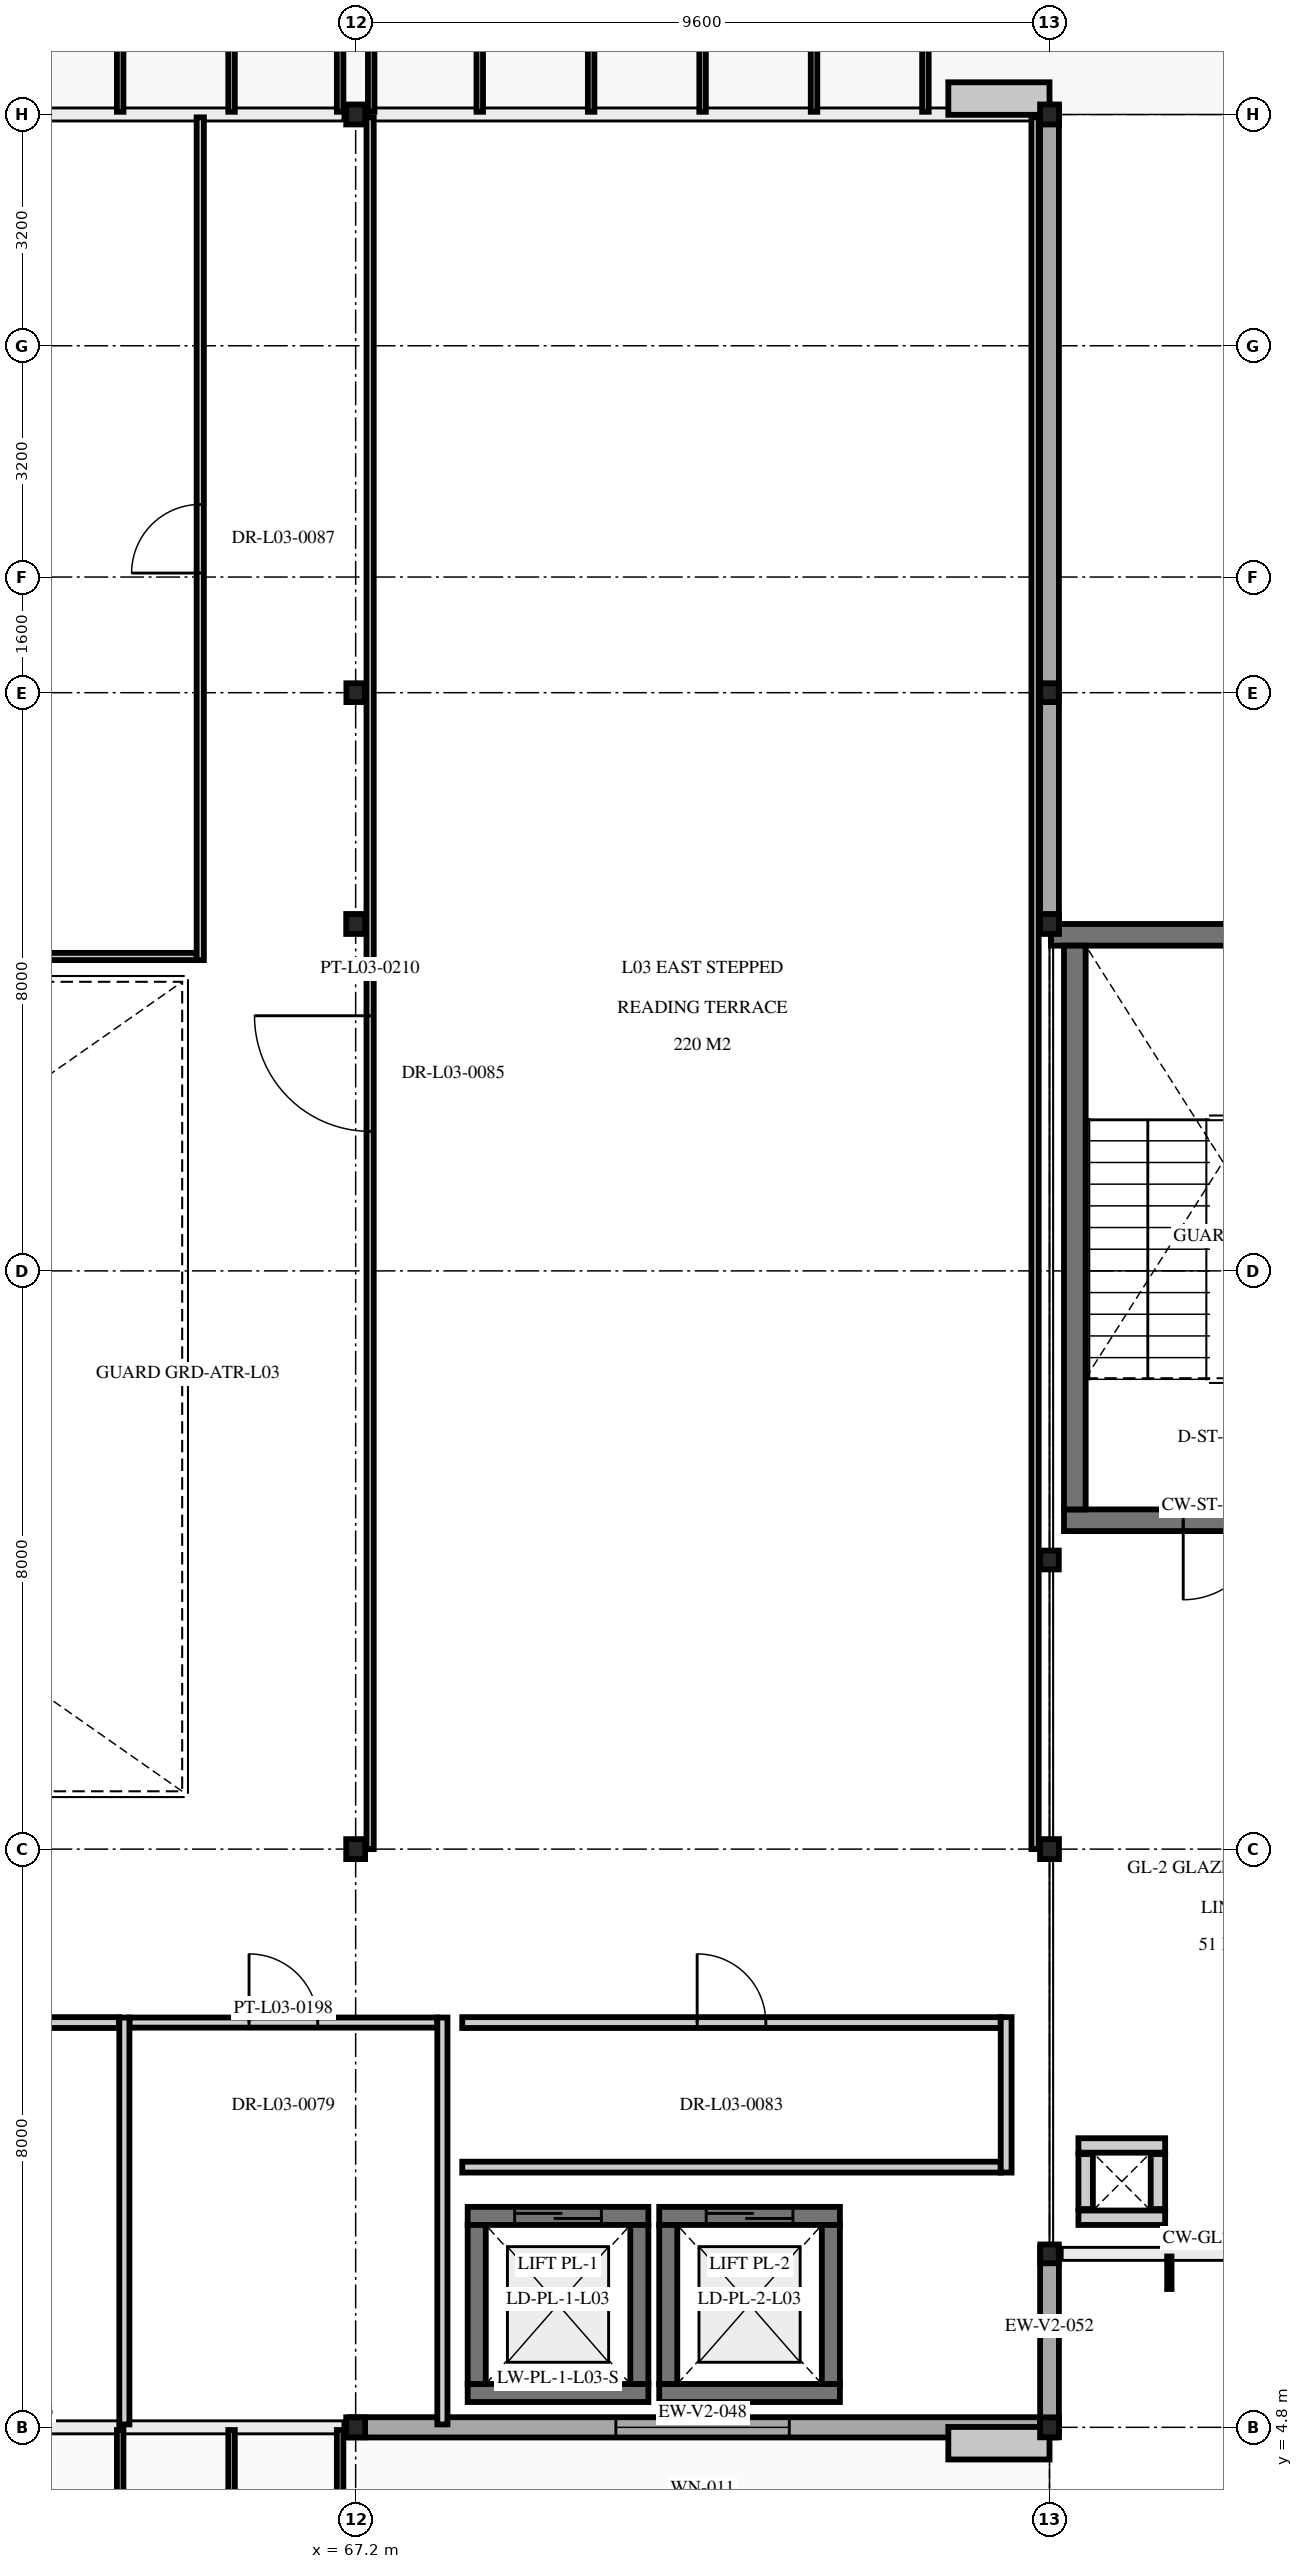
"""IFC4 building model, lengths in metres.
Left out: names, types, materials, properties, quantities, classifications, styles, units other than length and angle.
Written with IfcOpenShell. Run it as: python <this file> out.ifc"""

import sys

from ifc_helpers import new_model, si_unit, direction, frame, frame_2d, origin, origin_2d, place, context, subcontext, project, spatial, rectangle, i_section, extrude, element, fill, save


model = new_model("IFC4")
c1 = context("Model", 3, precision=1e-05, world=origin(), true_north=direction((0.0, 1.0)))
c2 = subcontext(c1, "Body", "Model", "MODEL_VIEW")
j1 = project(units=[si_unit("LENGTHUNIT", "METRE"), si_unit("PLANEANGLEUNIT", "RADIAN")], contexts=[c1])
p1 = place(None, origin())
s1 = spatial("IfcSite", under=j1, at=p1, CompositionType="ELEMENT")
p2 = place(p1, origin())
s2 = spatial("IfcBuilding", under=s1, at=p2, CompositionType="ELEMENT")
p3 = place(p2, frame((0.0, 0.0, 14.1)))
s3 = spatial("IfcBuildingStorey", under=s2, at=p3, CompositionType="ELEMENT", Elevation=14.1)
for number, where, z_axis, x_axis in (
    (1, (67.2, 4.8, 0.0), (0.0, 0.0, 1.0), (1.0, 0.0, 0.0)),
    (2, (67.2, 12.8, 0.0), (0.0, 0.0, 1.0), (1.0, 0.0, 0.0)),
    (3, (67.2, 25.6, 0.0), (0.0, 0.0, 1.0), (1.0, 0.0, 0.0)),
    (4, (67.2, 36.8, 0.0), (0.0, 0.0, 1.0), (1.0, 0.0, 0.0)),
    (5, (76.8, 4.8, 0.0), (0.0, 0.0, 1.0), (1.0, 0.0, 0.0)),
    (6, (76.8, 12.8, 0.0), (0.0, 0.0, 1.0), (1.0, 0.0, 0.0)),
    (7, (76.8, 25.6, 0.0), (0.0, 0.0, 1.0), (1.0, 0.0, 0.0)),
    (8, (76.8, 36.8, 0.0), (0.0, 0.0, 1.0), (1.0, 0.0, 0.0)),
):
    element("IfcColumn", number, at=place(p3, frame(where, z_axis=z_axis, x_axis=x_axis)), inside=s3, PredefinedType="COLUMN", context=c2, shape_type="SweptSolid", body=[
        extrude(i_section(OverallWidth=0.261, OverallDepth=0.276, WebThickness=0.015, FlangeThickness=0.025, at=origin_2d()), origin(), (0.0, 0.0, 1.0), 4.5),
    ])
for number, where, z_axis, x_axis in (
    (9, (67.2, 28.8, 0.0), (0.0, 0.0, 1.0), (1.0, 0.0, 0.0)),
    (10, (76.8, 28.8, 0.0), (0.0, 0.0, 1.0), (1.0, 0.0, 0.0)),
    (11, (76.8, 7.2, 0.0), (0.0, 0.0, 1.0), (1.0, 0.0, 0.0)),
    (12, (76.8, 16.8, 0.0), (0.0, 0.0, 1.0), (1.0, 0.0, 0.0)),
):
    element("IfcColumn", number, at=place(p3, frame(where, z_axis=z_axis, x_axis=x_axis)), inside=s3, PredefinedType="COLUMN", context=c2, shape_type="SweptSolid", body=[
        extrude(i_section(OverallWidth=0.256, OverallDepth=0.26, WebThickness=0.01, FlangeThickness=0.017, at=origin_2d()), origin(), (0.0, 0.0, 1.0), 4.5),
    ])
p4 = place(p3, frame((81.4, 17.35, 0.0), z_axis=(0.0, 0.0, 1.0), x_axis=(-1.0, 0.0, 0.0)))
e13 = element("IfcWall", 13, at=p4, inside=s3, PredefinedType="SHEAR", context=c2, shape_type="SweptSolid", body=[
    extrude(rectangle(XDim=4.4, YDim=0.3, at=frame_2d((2.2, 0.0))), origin(), (0.0, 0.0, 1.0), 4.25),
])
p5 = place(p4, frame((1.65, 0.0, 0.0)))
e14 = element("IfcOpeningElement", 14, at=p5, cuts=e13, PredefinedType="OPENING", context=c2, shape_type="SweptSolid", body=[
    extrude(rectangle(XDim=1.1, YDim=2.2, at=frame_2d((0.55, 1.1))), frame((0.0, 0.16, 0.0), z_axis=(0.0, -1.0, 0.0), x_axis=(1.0, 0.0, 0.0)), (0.0, 0.0, 1.0), 0.32),
])
p6 = place(p3, frame((76.82, 25.45, 0.0), z_axis=(0.0, 0.0, 1.0), x_axis=(1.0, 0.0, 0.0)))
e15 = element("IfcWall", 15, at=p6, inside=s3, PredefinedType="SHEAR", context=c2, shape_type="SweptSolid", body=[
    extrude(rectangle(XDim=4.76, YDim=0.3, at=frame_2d((2.38, 0.0))), origin(), (0.0, 0.0, 1.0), 4.25),
])
p7 = place(p3, frame((77.15, 17.5, 0.0), z_axis=(0.0, 0.0, 1.0), x_axis=(0.0, 1.0, 0.0)))
e16 = element("IfcWall", 16, at=p7, inside=s3, PredefinedType="SHEAR", context=c2, shape_type="SweptSolid", body=[
    extrude(rectangle(XDim=7.8, YDim=0.3, at=frame_2d((3.9, 0.0))), origin(), (0.0, 0.0, 1.0), 4.25),
])
p8 = place(p3, frame((71.25, 5.275, 0.0), z_axis=(0.0, 0.0, 1.0), x_axis=(-1.0, 0.0, 0.0)))
e17 = element("IfcWall", 17, at=p8, inside=s3, PredefinedType="SHEAR", context=c2, shape_type="SweptSolid", body=[
    extrude(rectangle(XDim=2.5, YDim=0.25, at=frame_2d((1.25, 0.0))), origin(), (0.0, 0.0, 1.0), 4.25),
])
p9 = place(p3, frame((68.75, 7.725, 0.0), z_axis=(0.0, 0.0, 1.0), x_axis=(1.0, 0.0, 0.0)))
e18 = element("IfcWall", 18, at=p9, inside=s3, PredefinedType="SHEAR", context=c2, shape_type="SweptSolid", body=[
    extrude(rectangle(XDim=2.5, YDim=0.25, at=frame_2d((1.25, 0.0))), origin(), (0.0, 0.0, 1.0), 4.25),
])
p10 = place(p9, frame((0.65, 0.0, 0.0)))
e19 = element("IfcOpeningElement", 19, at=p10, cuts=e18, PredefinedType="OPENING", context=c2, shape_type="SweptSolid", body=[
    extrude(rectangle(XDim=1.2, YDim=2.2, at=frame_2d((0.6, 1.1))), frame((0.0, 0.135, 0.0), z_axis=(0.0, -1.0, 0.0), x_axis=(1.0, 0.0, 0.0)), (0.0, 0.0, 1.0), 0.27),
])
for number, where, z_axis, x_axis in (
    (20, (68.875, 5.4, 0.0), (0.0, 0.0, 1.0), (0.0, 1.0, 0.0)),
    (21, (71.125, 7.6, 0.0), (0.0, 0.0, 1.0), (0.0, -1.0, 0.0)),
):
    element("IfcWall", number, at=place(p3, frame(where, z_axis=z_axis, x_axis=x_axis)), inside=s3, PredefinedType="SHEAR", context=c2, shape_type="SweptSolid", body=[
        extrude(rectangle(XDim=2.2, YDim=0.25, at=frame_2d((1.1, 0.0))), origin(), (0.0, 0.0, 1.0), 4.25),
    ])
p11 = place(p3, frame((73.9, 5.275, 0.0), z_axis=(0.0, 0.0, 1.0), x_axis=(-1.0, 0.0, 0.0)))
e22 = element("IfcWall", 22, at=p11, inside=s3, PredefinedType="SHEAR", context=c2, shape_type="SweptSolid", body=[
    extrude(rectangle(XDim=2.5, YDim=0.25, at=frame_2d((1.25, 0.0))), origin(), (0.0, 0.0, 1.0), 4.25),
])
p12 = place(p3, frame((71.4, 7.725, 0.0), z_axis=(0.0, 0.0, 1.0), x_axis=(1.0, 0.0, 0.0)))
e23 = element("IfcWall", 23, at=p12, inside=s3, PredefinedType="SHEAR", context=c2, shape_type="SweptSolid", body=[
    extrude(rectangle(XDim=2.5, YDim=0.25, at=frame_2d((1.25, 0.0))), origin(), (0.0, 0.0, 1.0), 4.25),
])
p13 = place(p12, frame((0.65, 0.0, 0.0)))
e24 = element("IfcOpeningElement", 24, at=p13, cuts=e23, PredefinedType="OPENING", context=c2, shape_type="SweptSolid", body=[
    extrude(rectangle(XDim=1.2, YDim=2.2, at=frame_2d((0.6, 1.1))), frame((0.0, 0.135, 0.0), z_axis=(0.0, -1.0, 0.0), x_axis=(1.0, 0.0, 0.0)), (0.0, 0.0, 1.0), 0.27),
])
for number, where, z_axis, x_axis in (
    (25, (71.525, 5.4, 0.0), (0.0, 0.0, 1.0), (0.0, 1.0, 0.0)),
    (26, (73.775, 7.6, 0.0), (0.0, 0.0, 1.0), (0.0, -1.0, 0.0)),
):
    element("IfcWall", number, at=place(p3, frame(where, z_axis=z_axis, x_axis=x_axis)), inside=s3, PredefinedType="SHEAR", context=c2, shape_type="SweptSolid", body=[
        extrude(rectangle(XDim=2.2, YDim=0.25, at=frame_2d((1.1, 0.0))), origin(), (0.0, 0.0, 1.0), 4.25),
    ])
for number, where, z_axis, x_axis in (
    (27, (78.4, 7.7, 0.0), (0.0, 0.0, 1.0), (-1.0, 0.0, 0.0)),
    (28, (77.2, 8.7, 0.0), (0.0, 0.0, 1.0), (1.0, 0.0, 0.0)),
):
    element("IfcWall", number, at=place(p3, frame(where, z_axis=z_axis, x_axis=x_axis)), inside=s3, PredefinedType="PARTITIONING", context=c2, shape_type="SweptSolid", body=[
        extrude(rectangle(XDim=1.2, YDim=0.2, at=frame_2d((0.6, 0.0))), origin(), (0.0, 0.0, 1.0), 3.75),
    ])
for number, where, z_axis, x_axis in (
    (29, (77.3, 7.82, 0.0), (0.0, 0.0, 1.0), (0.0, 1.0, 0.0)),
    (30, (78.3, 8.58, 0.0), (0.0, 0.0, 1.0), (0.0, -1.0, 0.0)),
):
    element("IfcWall", number, at=place(p3, frame(where, z_axis=z_axis, x_axis=x_axis)), inside=s3, PredefinedType="PARTITIONING", context=c2, shape_type="SweptSolid", body=[
        extrude(rectangle(XDim=0.76, YDim=0.2, at=frame_2d((0.38, 0.0))), origin(), (0.0, 0.0, 1.0), 3.75),
    ])
p14 = place(p3, frame((76.885, 4.8, 0.0), z_axis=(0.0, 0.0, 1.0), x_axis=(-1.0, 0.0, 0.0)))
e31 = element("IfcWall", 31, at=p14, inside=s3, PredefinedType="SOLIDWALL", context=c2, shape_type="SweptSolid", body=[
    extrude(rectangle(XDim=9.77, YDim=0.28, at=frame_2d((4.885, 0.0))), origin(), (0.0, 0.0, 1.0), 3.862),
])
p15 = place(p14, frame((3.685, 0.0, 0.95)))
e32 = element("IfcOpeningElement", 32, at=p15, cuts=e31, PredefinedType="OPENING", context=c2, shape_type="SweptSolid", body=[
    extrude(rectangle(XDim=2.4, YDim=2.1, at=frame_2d((1.2, 1.05))), frame((0.0, 0.15, 0.0), z_axis=(0.0, -1.0, 0.0), x_axis=(1.0, 0.0, 0.0)), (0.0, 0.0, 1.0), 0.3),
])
p16 = place(p3, frame((76.8, 7.285, 0.0), z_axis=(0.0, 0.0, 1.0), x_axis=(0.0, -1.0, 0.0)))
e33 = element("IfcWall", 33, at=p16, inside=s3, PredefinedType="SOLIDWALL", context=c2, shape_type="SweptSolid", body=[
    extrude(rectangle(XDim=2.57, YDim=0.26, at=frame_2d((1.285, 0.0))), origin(), (0.0, 0.0, 1.0), 3.835),
])
p17 = place(p3, frame((76.8, 36.885, 0.0), z_axis=(0.0, 0.0, 1.0), x_axis=(0.0, -1.0, 0.0)))
e34 = element("IfcWall", 34, at=p17, inside=s3, PredefinedType="SOLIDWALL", context=c2, shape_type="SweptSolid", body=[
    extrude(rectangle(XDim=11.37, YDim=0.26, at=frame_2d((5.685, 0.0))), origin(), (0.0, 0.0, 1.0), 3.835),
])
p18 = place(p3, frame((64.07, 10.4, 0.0), z_axis=(0.0, 0.0, 1.0), x_axis=(1.0, 0.0, 0.0)))
e35 = element("IfcWall", 35, at=p18, inside=s3, PredefinedType="PARTITIONING", context=c2, shape_type="SweptSolid", body=[
    extrude(rectangle(XDim=4.26, YDim=0.14, at=frame_2d((2.13, 0.0))), origin(), (0.0, 0.0, 1.0), 3.862),
])
p19 = place(p18, frame((1.655, 0.0, 0.0)))
e36 = element("IfcOpeningElement", 36, at=p19, cuts=e35, PredefinedType="OPENING", context=c2, shape_type="SweptSolid", body=[
    extrude(rectangle(XDim=0.95, YDim=2.1, at=frame_2d((0.475, 1.05))), frame((0.0, 0.08, 0.0), z_axis=(0.0, -1.0, 0.0), x_axis=(1.0, 0.0, 0.0)), (0.0, 0.0, 1.0), 0.16),
])
for number, where, z_axis, x_axis in (
    (37, (64.0, 4.84, 0.0), (0.0, 0.0, 1.0), (0.0, 1.0, 0.0)),
    (38, (68.4, 4.84, 0.0), (0.0, 0.0, 1.0), (0.0, 1.0, 0.0)),
):
    element("IfcWall", number, at=place(p3, frame(where, z_axis=z_axis, x_axis=x_axis)), inside=s3, PredefinedType="PARTITIONING", context=c2, shape_type="SweptSolid", body=[
        extrude(rectangle(XDim=5.63, YDim=0.14, at=frame_2d((2.815, 0.0))), origin(), (0.0, 0.0, 1.0), 3.965),
    ])
p20 = place(p3, frame((57.6, 10.4, 0.0), z_axis=(0.0, 0.0, 1.0), x_axis=(1.0, 0.0, 0.0)))
e39 = element("IfcWall", 39, at=p20, inside=s3, PredefinedType="PARTITIONING", context=c2, shape_type="SweptSolid", body=[
    extrude(rectangle(XDim=6.325, YDim=0.15, at=frame_2d((3.163, 0.0))), origin(), (0.0, 0.0, 1.0), 3.862),
])
p21 = place(p20, frame((2.587, 0.0, 0.0)))
e40 = element("IfcOpeningElement", 40, at=p21, cuts=e39, PredefinedType="OPENING", context=c2, shape_type="SweptSolid", body=[
    extrude(rectangle(XDim=1.15, YDim=2.25, at=frame_2d((0.575, 1.125))), frame((0.0, 0.085, 0.0), z_axis=(0.0, -1.0, 0.0), x_axis=(1.0, 0.0, 0.0)), (0.0, 0.0, 1.0), 0.17),
])
p22 = place(p3, frame((68.675, 8.4, 0.0), z_axis=(0.0, 0.0, 1.0), x_axis=(1.0, 0.0, 0.0)))
e41 = element("IfcWall", 41, at=p22, inside=s3, PredefinedType="PARTITIONING", context=c2, shape_type="SweptSolid", body=[
    extrude(rectangle(XDim=7.45, YDim=0.15, at=frame_2d((3.725, 0.0))), origin(), (0.0, 0.0, 1.0), 4.015),
])
p23 = place(p3, frame((68.675, 10.4, 0.0), z_axis=(0.0, 0.0, 1.0), x_axis=(1.0, 0.0, 0.0)))
e42 = element("IfcWall", 42, at=p23, inside=s3, PredefinedType="PARTITIONING", context=c2, shape_type="SweptSolid", body=[
    extrude(rectangle(XDim=7.45, YDim=0.15, at=frame_2d((3.725, 0.0))), origin(), (0.0, 0.0, 1.0), 4.015),
])
p24 = place(p23, frame((3.25, 0.0, 0.0)))
e43 = element("IfcOpeningElement", 43, at=p24, cuts=e42, PredefinedType="OPENING", context=c2, shape_type="SweptSolid", body=[
    extrude(rectangle(XDim=0.95, YDim=2.15, at=frame_2d((0.475, 1.075))), frame((0.0, 0.085, 0.0), z_axis=(0.0, -1.0, 0.0), x_axis=(1.0, 0.0, 0.0)), (0.0, 0.0, 1.0), 0.17),
])
p25 = place(p3, frame((76.2, 8.325, 0.0), z_axis=(0.0, 0.0, 1.0), x_axis=(0.0, 1.0, 0.0)))
e44 = element("IfcWall", 44, at=p25, inside=s3, PredefinedType="PARTITIONING", context=c2, shape_type="SweptSolid", body=[
    extrude(rectangle(XDim=2.15, YDim=0.15, at=frame_2d((1.075, 0.0))), origin(), (0.0, 0.0, 1.0), 4.25),
])
p26 = place(p3, frame((67.4, 12.8, 0.0), z_axis=(0.0, 0.0, 1.0), x_axis=(0.0, 1.0, 0.0)))
e45 = element("IfcWall", 45, at=p26, inside=s3, PredefinedType="MOVABLE", context=c2, shape_type="SweptSolid", body=[
    extrude(rectangle(XDim=23.96, YDim=0.1, at=frame_2d((11.98, 0.0))), origin(), (0.0, 0.0, 1.0), 3.862),
])
p27 = place(p26, frame((9.93, 0.0, 0.0)))
e46 = element("IfcOpeningElement", 46, at=p27, cuts=e45, PredefinedType="OPENING", context=c2, shape_type="SweptSolid", body=[
    extrude(rectangle(XDim=1.6, YDim=2.25, at=frame_2d((0.8, 1.125))), frame((0.0, 0.06, 0.0), z_axis=(0.0, -1.0, 0.0), x_axis=(1.0, 0.0, 0.0)), (0.0, 0.0, 1.0), 0.12),
])
p28 = place(p3, frame((76.6, 12.8, 0.0), z_axis=(0.0, 0.0, 1.0), x_axis=(0.0, 1.0, 0.0)))
e47 = element("IfcWall", 47, at=p28, inside=s3, PredefinedType="MOVABLE", context=c2, shape_type="SweptSolid", body=[
    extrude(rectangle(XDim=23.96, YDim=0.1, at=frame_2d((11.98, 0.0))), origin(), (0.0, 0.0, 1.0), 3.862),
])
p29 = place(p3, frame((57.6, 25.15, 0.0), z_axis=(0.0, 0.0, 1.0), x_axis=(1.0, 0.0, 0.0)))
e48 = element("IfcWall", 48, at=p29, inside=s3, PredefinedType="MOVABLE", context=c2, shape_type="SweptSolid", body=[
    extrude(rectangle(XDim=7.4, YDim=0.1, at=frame_2d((3.7, 0.0))), origin(), (0.0, 0.0, 1.0), 4.25),
])
p30 = place(p3, frame((65.05, 25.1, 0.0), z_axis=(0.0, 0.0, 1.0), x_axis=(0.0, 1.0, 0.0)))
e49 = element("IfcWall", 49, at=p30, inside=s3, PredefinedType="MOVABLE", context=c2, shape_type="SweptSolid", body=[
    extrude(rectangle(XDim=11.66, YDim=0.1, at=frame_2d((5.83, 0.0))), origin(), (0.0, 0.0, 1.0), 3.965),
])
p31 = place(p30, frame((5.355, 0.0, 0.0)))
e50 = element("IfcOpeningElement", 50, at=p31, cuts=e49, PredefinedType="OPENING", context=c2, shape_type="SweptSolid", body=[
    extrude(rectangle(XDim=0.95, YDim=2.15, at=frame_2d((0.475, 1.075))), frame((0.0, 0.06, 0.0), z_axis=(0.0, -1.0, 0.0), x_axis=(1.0, 0.0, 0.0)), (0.0, 0.0, 1.0), 0.12),
])
p32 = place(p5, origin())
e51 = element("IfcDoor", 51, at=p32, inside=s3, OperationType="SINGLE_SWING_RIGHT", PredefinedType="DOOR", context=c2, shape_type="SweptSolid", body=[
    extrude(rectangle(XDim=1.1, YDim=2.2, at=frame_2d((0.55, 1.1))), frame((0.0, 0.025, 0.0), z_axis=(0.0, -1.0, 0.0), x_axis=(1.0, 0.0, 0.0)), (0.0, 0.0, 1.0), 0.05),
])
fill(e14, e51)
p33 = place(p10, origin())
e52 = element("IfcDoor", 52, at=p33, inside=s3, OperationType="DOUBLE_DOOR_SLIDING", PredefinedType="DOOR", context=c2, shape_type="SweptSolid", body=[
    extrude(rectangle(XDim=1.2, YDim=2.2, at=frame_2d((0.6, 1.1))), frame((0.0, 0.025, 0.0), z_axis=(0.0, -1.0, 0.0), x_axis=(1.0, 0.0, 0.0)), (0.0, 0.0, 1.0), 0.05),
])
fill(e19, e52)
p34 = place(p13, origin())
e53 = element("IfcDoor", 53, at=p34, inside=s3, OperationType="DOUBLE_DOOR_SLIDING", PredefinedType="DOOR", context=c2, shape_type="SweptSolid", body=[
    extrude(rectangle(XDim=1.2, YDim=2.2, at=frame_2d((0.6, 1.1))), frame((0.0, 0.025, 0.0), z_axis=(0.0, -1.0, 0.0), x_axis=(1.0, 0.0, 0.0)), (0.0, 0.0, 1.0), 0.05),
])
fill(e24, e53)
p35 = place(p15, origin())
e54 = element("IfcWindow", 54, at=p35, inside=s3, PartitioningType="SINGLE_PANEL", PredefinedType="WINDOW", context=c2, shape_type="SweptSolid", body=[
    extrude(rectangle(XDim=2.4, YDim=2.1, at=frame_2d((1.2, 1.05))), frame((0.0, 0.03, 0.0), z_axis=(0.0, -1.0, 0.0), x_axis=(1.0, 0.0, 0.0)), (0.0, 0.0, 1.0), 0.06),
])
fill(e32, e54)
p36 = place(p19, origin())
e55 = element("IfcDoor", 55, at=p36, inside=s3, OperationType="SINGLE_SWING_LEFT", PredefinedType="DOOR", context=c2, shape_type="SweptSolid", body=[
    extrude(rectangle(XDim=0.95, YDim=2.1, at=frame_2d((0.475, 1.05))), frame((0.0, 0.025, 0.0), z_axis=(0.0, -1.0, 0.0), x_axis=(1.0, 0.0, 0.0)), (0.0, 0.0, 1.0), 0.05),
])
fill(e36, e55)
p37 = place(p24, origin())
e56 = element("IfcDoor", 56, at=p37, inside=s3, OperationType="SINGLE_SWING_LEFT", PredefinedType="DOOR", context=c2, shape_type="SweptSolid", body=[
    extrude(rectangle(XDim=0.95, YDim=2.15, at=frame_2d((0.475, 1.075))), frame((0.0, 0.025, 0.0), z_axis=(0.0, -1.0, 0.0), x_axis=(1.0, 0.0, 0.0)), (0.0, 0.0, 1.0), 0.05),
])
fill(e43, e56)
p38 = place(p27, origin())
e57 = element("IfcDoor", 57, at=p38, inside=s3, OperationType="DOUBLE_DOOR_SINGLE_SWING", PredefinedType="DOOR", context=c2, shape_type="SweptSolid", body=[
    extrude(rectangle(XDim=1.6, YDim=2.25, at=frame_2d((0.8, 1.125))), frame((0.0, 0.025, 0.0), z_axis=(0.0, -1.0, 0.0), x_axis=(1.0, 0.0, 0.0)), (0.0, 0.0, 1.0), 0.05),
])
fill(e46, e57)
p39 = place(p31, origin())
e58 = element("IfcDoor", 58, at=p39, inside=s3, OperationType="SINGLE_SWING_LEFT", PredefinedType="DOOR", context=c2, shape_type="SweptSolid", body=[
    extrude(rectangle(XDim=0.95, YDim=2.15, at=frame_2d((0.475, 1.075))), frame((0.0, 0.025, 0.0), z_axis=(0.0, -1.0, 0.0), x_axis=(1.0, 0.0, 0.0)), (0.0, 0.0, 1.0), 0.05),
])
fill(e50, e58)
save(model, sys.argv[1])
